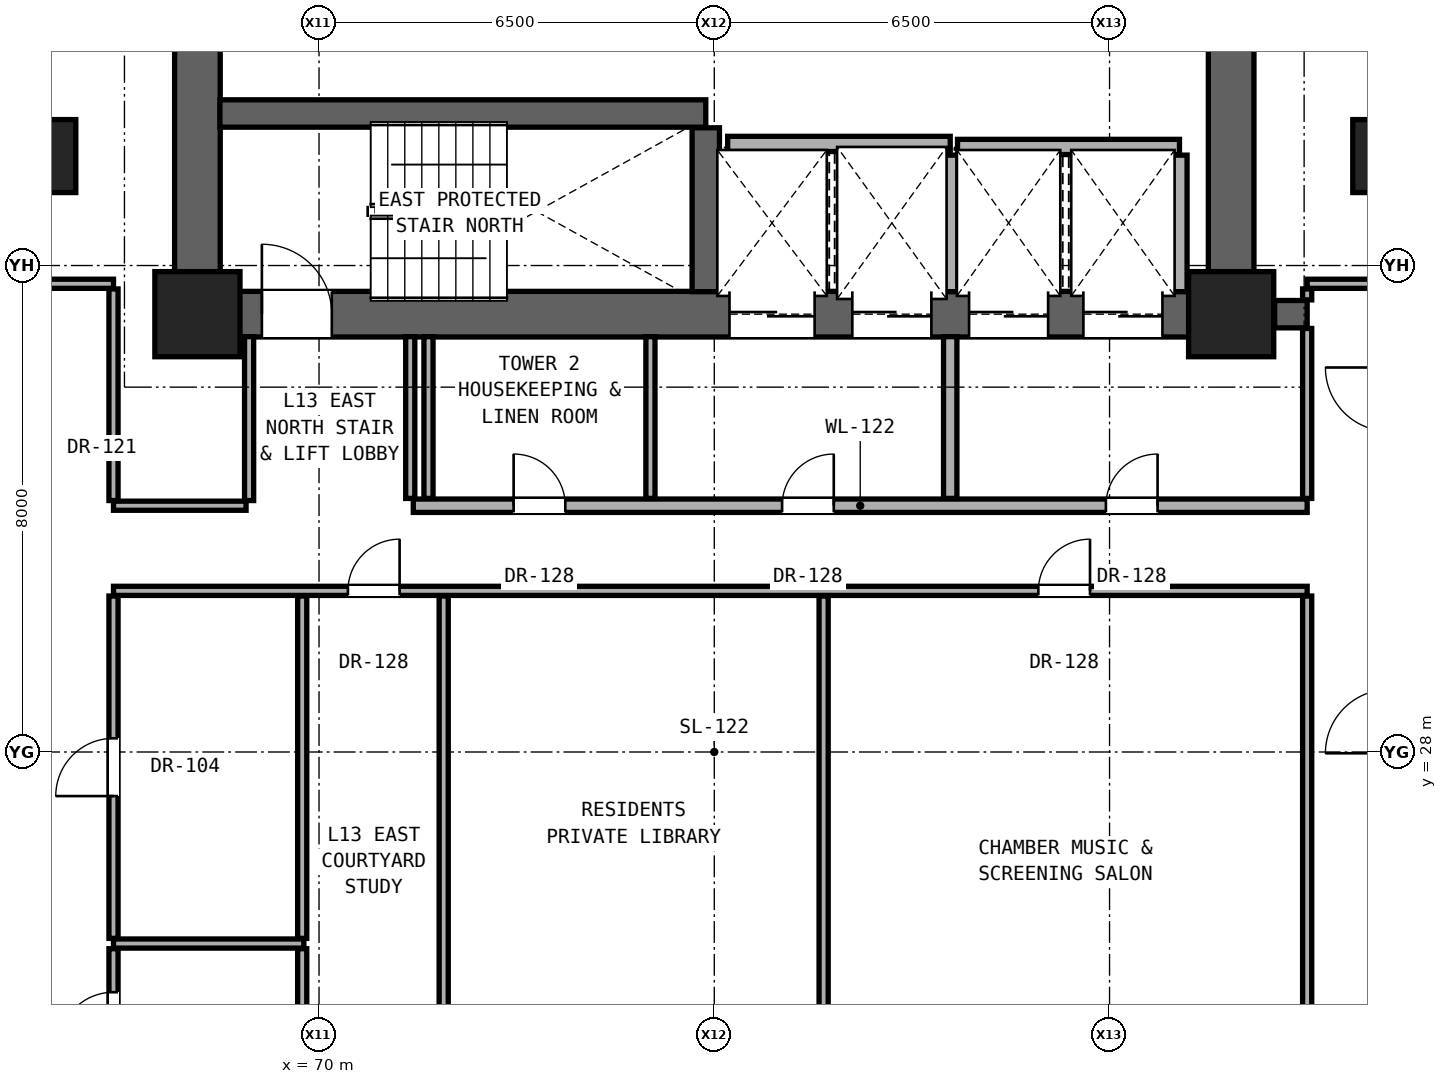
"""IFC4 building model, lengths in metres.
Left out: names, types, materials, properties, quantities, classifications, styles, units other than length and angle.
Written with IfcOpenShell. Run it as: python <this file> out.ifc"""

import sys

from ifc_helpers import new_model, si_unit, direction, frame, frame_2d, origin, origin_2d, place, context, subcontext, project, spatial, rectangle, extrude, element, fill, save


model = new_model("IFC4")
c1 = context("Model", 3, precision=1e-05, world=origin(), true_north=direction((0.0, 1.0)))
c2 = subcontext(c1, "Body", "Model", "MODEL_VIEW")
j1 = project(units=[si_unit("LENGTHUNIT", "METRE"), si_unit("PLANEANGLEUNIT", "RADIAN")], contexts=[c1])
p1 = place(None, origin())
s1 = spatial("IfcSite", under=j1, at=p1, CompositionType="ELEMENT")
p2 = place(p1, origin())
s2 = spatial("IfcBuilding", under=s1, at=p2, CompositionType="ELEMENT")
p3 = place(p2, frame((0.0, 0.0, 48.8)))
s3 = spatial("IfcBuildingStorey", under=s2, at=p3, CompositionType="ELEMENT", Elevation=48.8)
for number, where, z_axis, x_axis in (
    (1, (68.0, 35.2, 0.0), (0.0, 0.0, 1.0), (1.0, 0.0, 0.0)),
    (2, (85.0, 35.2, 0.0), (0.0, 0.0, 1.0), (1.0, 0.0, 0.0)),
):
    element("IfcColumn", number, at=place(p3, frame(where, z_axis=z_axis, x_axis=x_axis)), inside=s3, PredefinedType="COLUMN", context=c2, shape_type="SweptSolid", body=[
        extrude(rectangle(XDim=1.4, YDim=1.4, at=origin_2d()), origin(), (0.0, 0.0, 1.0), 3.3),
    ])
for number, where, z_axis, x_axis in (
    (3, (65.6, 37.8, 0.0), (0.0, 0.0, 1.0), (1.0, 0.0, 0.0)),
    (4, (87.4, 37.8, 0.0), (0.0, 0.0, 1.0), (1.0, 0.0, 0.0)),
):
    element("IfcColumn", number, at=place(p3, frame(where, z_axis=z_axis, x_axis=x_axis)), inside=s3, PredefinedType="PILASTER", context=c2, shape_type="SweptSolid", body=[
        extrude(rectangle(XDim=0.8, YDim=1.2, at=origin_2d()), origin(), (0.0, 0.0, 1.0), 3.3),
    ])
for number, where, z_axis, x_axis in (
    (5, (68.0, 35.2, 0.0), (0.0, 0.0, 1.0), (0.0, 1.0, 0.0)),
    (6, (85.0, 35.2, 0.0), (0.0, 0.0, 1.0), (0.0, 1.0, 0.0)),
):
    element("IfcWall", number, at=place(p3, frame(where, z_axis=z_axis, x_axis=x_axis)), inside=s3, PredefinedType="SHEAR", context=c2, shape_type="SweptSolid", body=[
        extrude(rectangle(XDim=5.6, YDim=0.75, at=frame_2d((2.8, 0.0))), origin(), (0.0, 0.0, 1.0), 3.06),
    ])
p4 = place(p3, frame((68.0, 35.2, 0.0), z_axis=(0.0, 0.0, 1.0), x_axis=(1.0, 0.0, 0.0)))
e7 = element("IfcWall", 7, at=p4, inside=s3, PredefinedType="SHEAR", context=c2, shape_type="SweptSolid", body=[
    extrude(rectangle(XDim=17.0, YDim=0.75, at=frame_2d((8.5, 0.0))), origin(), (0.0, 0.0, 1.0), 3.06),
])
p5 = place(p4, frame((1.06, 0.0, 0.0)))
e8 = element("IfcOpeningElement", 8, at=p5, cuts=e7, PredefinedType="OPENING", context=c2, shape_type="SweptSolid", body=[
    extrude(rectangle(XDim=1.15, YDim=2.2, at=frame_2d((0.575, 1.1))), frame((0.0, 0.385, 0.0), z_axis=(0.0, -1.0, 0.0), x_axis=(1.0, 0.0, 0.0)), (0.0, 0.0, 1.0), 0.77),
])
p6 = place(p4, frame((8.75, 0.0, 0.0)))
e9 = element("IfcOpeningElement", 9, at=p6, cuts=e7, PredefinedType="OPENING", context=c2, shape_type="SweptSolid", body=[
    extrude(rectangle(XDim=1.4, YDim=2.35, at=frame_2d((0.7, 1.175))), frame((0.0, 0.385, 0.0), z_axis=(0.0, -1.0, 0.0), x_axis=(1.0, 0.0, 0.0)), (0.0, 0.0, 1.0), 0.77),
])
p7 = place(p4, frame((10.77, 0.0, 0.0)))
e10 = element("IfcOpeningElement", 10, at=p7, cuts=e7, PredefinedType="OPENING", context=c2, shape_type="SweptSolid", body=[
    extrude(rectangle(XDim=1.3, YDim=2.3, at=frame_2d((0.65, 1.15))), frame((0.0, 0.385, 0.0), z_axis=(0.0, -1.0, 0.0), x_axis=(1.0, 0.0, 0.0)), (0.0, 0.0, 1.0), 0.77),
])
p8 = place(p4, frame((12.69, 0.0, 0.0)))
e11 = element("IfcOpeningElement", 11, at=p8, cuts=e7, PredefinedType="OPENING", context=c2, shape_type="SweptSolid", body=[
    extrude(rectangle(XDim=1.3, YDim=2.3, at=frame_2d((0.65, 1.15))), frame((0.0, 0.385, 0.0), z_axis=(0.0, -1.0, 0.0), x_axis=(1.0, 0.0, 0.0)), (0.0, 0.0, 1.0), 0.77),
])
p9 = place(p4, frame((14.57, 0.0, 0.0)))
e12 = element("IfcOpeningElement", 12, at=p9, cuts=e7, PredefinedType="OPENING", context=c2, shape_type="SweptSolid", body=[
    extrude(rectangle(XDim=1.3, YDim=2.3, at=frame_2d((0.65, 1.15))), frame((0.0, 0.385, 0.0), z_axis=(0.0, -1.0, 0.0), x_axis=(1.0, 0.0, 0.0)), (0.0, 0.0, 1.0), 0.77),
])
p10 = place(p3, frame((66.62, 24.85, 0.0), z_axis=(0.0, 0.0, 1.0), x_axis=(1.0, 0.0, 0.0)))
e13 = element("IfcWall", 13, at=p10, inside=s3, PredefinedType="PARTITIONING", context=c2, shape_type="SweptSolid", body=[
    extrude(rectangle(XDim=3.13, YDim=0.15, at=frame_2d((1.565, 0.0))), origin(), (0.0, 0.0, 1.0), 2.125),
])
p11 = place(p3, frame((66.62, 30.65, 0.0), z_axis=(0.0, 0.0, 1.0), x_axis=(1.0, 0.0, 0.0)))
e14 = element("IfcWall", 14, at=p11, inside=s3, PredefinedType="PARTITIONING", context=c2, shape_type="SweptSolid", body=[
    extrude(rectangle(XDim=19.63, YDim=0.15, at=frame_2d((9.815, 0.0))), origin(), (0.0, 0.0, 1.0), 2.125),
])
p12 = place(p11, frame((3.855, 0.0, 0.0)))
e15 = element("IfcOpeningElement", 15, at=p12, cuts=e14, PredefinedType="OPENING", context=c2, shape_type="SweptSolid", body=[
    extrude(rectangle(XDim=0.85, YDim=2.01, at=frame_2d((0.425, 1.005))), frame((0.0, 0.085, 0.0), z_axis=(0.0, -1.0, 0.0), x_axis=(1.0, 0.0, 0.0)), (0.0, 0.0, 1.0), 0.17),
])
p13 = place(p11, frame((15.209, 0.0, 0.0)))
e16 = element("IfcOpeningElement", 16, at=p13, cuts=e14, PredefinedType="OPENING", context=c2, shape_type="SweptSolid", body=[
    extrude(rectangle(XDim=0.85, YDim=2.01, at=frame_2d((0.425, 1.005))), frame((0.0, 0.085, 0.0), z_axis=(0.0, -1.0, 0.0), x_axis=(1.0, 0.0, 0.0)), (0.0, 0.0, 1.0), 0.17),
])
p14 = place(p3, frame((66.62, 32.05, 0.0), z_axis=(0.0, 0.0, 1.0), x_axis=(1.0, 0.0, 0.0)))
e17 = element("IfcWall", 17, at=p14, inside=s3, PredefinedType="PARTITIONING", context=c2, shape_type="SweptSolid", body=[
    extrude(rectangle(XDim=2.18, YDim=0.15, at=frame_2d((1.09, 0.0))), origin(), (0.0, 0.0, 1.0), 2.125),
])
p15 = place(p3, frame((71.55, 32.05, 0.0), z_axis=(0.0, 0.0, 1.0), x_axis=(1.0, 0.0, 0.0)))
e18 = element("IfcWall", 18, at=p15, inside=s3, PredefinedType="SOLIDWALL", context=c2, shape_type="SweptSolid", body=[
    extrude(rectangle(XDim=14.7, YDim=0.22, at=frame_2d((7.35, 0.0))), origin(), (0.0, 0.0, 1.0), 2.125),
])
p16 = place(p15, frame((11.39, 0.0, 0.0)))
e19 = element("IfcOpeningElement", 19, at=p16, cuts=e18, PredefinedType="OPENING", context=c2, shape_type="SweptSolid", body=[
    extrude(rectangle(XDim=0.85, YDim=2.01, at=frame_2d((0.425, 1.005))), frame((0.0, 0.12, 0.0), z_axis=(0.0, -1.0, 0.0), x_axis=(1.0, 0.0, 0.0)), (0.0, 0.0, 1.0), 0.24),
])
p17 = place(p15, frame((6.065, 0.0, 0.0)))
e20 = element("IfcOpeningElement", 20, at=p17, cuts=e18, PredefinedType="OPENING", context=c2, shape_type="SweptSolid", body=[
    extrude(rectangle(XDim=0.85, YDim=2.01, at=frame_2d((0.425, 1.005))), frame((0.0, 0.12, 0.0), z_axis=(0.0, -1.0, 0.0), x_axis=(1.0, 0.0, 0.0)), (0.0, 0.0, 1.0), 0.24),
])
p18 = place(p15, frame((1.65, 0.0, 0.0)))
e21 = element("IfcOpeningElement", 21, at=p18, cuts=e18, PredefinedType="OPENING", context=c2, shape_type="SweptSolid", body=[
    extrude(rectangle(XDim=0.85, YDim=2.01, at=frame_2d((0.425, 1.005))), frame((0.0, 0.12, 0.0), z_axis=(0.0, -1.0, 0.0), x_axis=(1.0, 0.0, 0.0)), (0.0, 0.0, 1.0), 0.24),
])
p19 = place(p3, frame((85.715, 35.2, 0.0), z_axis=(0.0, 0.0, 1.0), x_axis=(1.0, 0.0, 0.0)))
e22 = element("IfcWall", 22, at=p19, inside=s3, PredefinedType="SHEAR", context=c2, shape_type="SweptSolid", body=[
    extrude(rectangle(XDim=0.535, YDim=0.45, at=frame_2d((0.268, 0.0))), origin(), (0.0, 0.0, 1.0), 3.06),
])
p20 = place(p3, frame((65.25, 35.7, 0.0), z_axis=(0.0, 0.0, 1.0), x_axis=(1.0, 0.0, 0.0)))
e23 = element("IfcWall", 23, at=p20, inside=s3, PredefinedType="PARTITIONING", context=c2, shape_type="SweptSolid", body=[
    extrude(rectangle(XDim=1.37, YDim=0.15, at=frame_2d((0.685, 0.0))), origin(), (0.0, 0.0, 1.0), 3.06),
])
p21 = place(p3, frame((86.25, 35.7, 0.0), z_axis=(0.0, 0.0, 1.0), x_axis=(1.0, 0.0, 0.0)))
e24 = element("IfcWall", 24, at=p21, inside=s3, PredefinedType="PARTITIONING", context=c2, shape_type="SweptSolid", body=[
    extrude(rectangle(XDim=1.35, YDim=0.15, at=frame_2d((0.675, 0.0))), origin(), (0.0, 0.0, 1.0), 3.06),
])
p22 = place(p3, frame((80.5, 37.95, 0.0), z_axis=(0.0, 0.0, 1.0), x_axis=(1.0, 0.0, 0.0)))
e25 = element("IfcWall", 25, at=p22, inside=s3, PredefinedType="SOLIDWALL", context=c2, shape_type="SweptSolid", body=[
    extrude(rectangle(XDim=3.65, YDim=0.25, at=frame_2d((1.825, 0.0))), origin(), (0.0, 0.0, 1.0), 3.06),
])
p23 = place(p3, frame((76.72, 38.0, 0.0), z_axis=(0.0, 0.0, 1.0), x_axis=(1.0, 0.0, 0.0)))
e26 = element("IfcWall", 26, at=p23, inside=s3, PredefinedType="SOLIDWALL", context=c2, shape_type="SweptSolid", body=[
    extrude(rectangle(XDim=3.66, YDim=0.25, at=frame_2d((1.83, 0.0))), origin(), (0.0, 0.0, 1.0), 3.06),
])
p24 = place(p3, frame((68.37, 38.5, 0.0), z_axis=(0.0, 0.0, 1.0), x_axis=(1.0, 0.0, 0.0)))
e27 = element("IfcWall", 27, at=p24, inside=s3, PredefinedType="SHEAR", context=c2, shape_type="SweptSolid", body=[
    extrude(rectangle(XDim=7.99, YDim=0.45, at=frame_2d((3.995, 0.0))), origin(), (0.0, 0.0, 1.0), 3.06),
])
p25 = place(p3, frame((66.62, 22.435, 0.0), z_axis=(0.0, 0.0, 1.0), x_axis=(0.0, 1.0, 0.0)))
e28 = element("IfcWall", 28, at=p25, inside=s3, PredefinedType="PARTITIONING", context=c2, shape_type="SweptSolid", body=[
    extrude(rectangle(XDim=2.33, YDim=0.15, at=frame_2d((1.165, 0.0))), origin(), (0.0, 0.0, 1.0), 3.06),
])
p26 = place(p25, frame((0.715, 0.0, 0.0)))
e29 = element("IfcOpeningElement", 29, at=p26, cuts=e28, PredefinedType="OPENING", context=c2, shape_type="SweptSolid", body=[
    extrude(rectangle(XDim=0.9, YDim=2.1, at=frame_2d((0.45, 1.05))), frame((0.0, 0.085, 0.0), z_axis=(0.0, -1.0, 0.0), x_axis=(1.0, 0.0, 0.0)), (0.0, 0.0, 1.0), 0.17),
])
p27 = place(p3, frame((66.62, 24.935, 0.0), z_axis=(0.0, 0.0, 1.0), x_axis=(0.0, 1.0, 0.0)))
e30 = element("IfcWall", 30, at=p27, inside=s3, PredefinedType="PARTITIONING", context=c2, shape_type="SweptSolid", body=[
    extrude(rectangle(XDim=5.63, YDim=0.15, at=frame_2d((2.815, 0.0))), origin(), (0.0, 0.0, 1.0), 2.279),
])
p28 = place(p27, frame((2.34, 0.0, 0.0)))
e31 = element("IfcOpeningElement", 31, at=p28, cuts=e30, PredefinedType="OPENING", context=c2, shape_type="SweptSolid", body=[
    extrude(rectangle(XDim=0.95, YDim=2.15, at=frame_2d((0.475, 1.075))), frame((0.0, 0.085, 0.0), z_axis=(0.0, -1.0, 0.0), x_axis=(1.0, 0.0, 0.0)), (0.0, 0.0, 1.0), 0.17),
])
p29 = place(p3, frame((66.62, 32.135, 0.0), z_axis=(0.0, 0.0, 1.0), x_axis=(0.0, 1.0, 0.0)))
e32 = element("IfcWall", 32, at=p29, inside=s3, PredefinedType="PARTITIONING", context=c2, shape_type="SweptSolid", body=[
    extrude(rectangle(XDim=3.48, YDim=0.15, at=frame_2d((1.74, 0.0))), origin(), (0.0, 0.0, 1.0), 2.452),
])
p30 = place(p3, frame((68.85, 32.135, 0.0), z_axis=(0.0, 0.0, 1.0), x_axis=(0.0, 1.0, 0.0)))
e33 = element("IfcWall", 33, at=p30, inside=s3, PredefinedType="PARTITIONING", context=c2, shape_type="SweptSolid", body=[
    extrude(rectangle(XDim=2.695, YDim=0.15, at=frame_2d((1.348, 0.0))), origin(), (0.0, 0.0, 1.0), 3.06),
])
p31 = place(p3, frame((69.723, 22.435, 0.0), z_axis=(0.0, 0.0, 1.0), x_axis=(0.0, 1.0, 0.0)))
e34 = element("IfcWall", 34, at=p31, inside=s3, PredefinedType="PARTITIONING", context=c2, shape_type="SweptSolid", body=[
    extrude(rectangle(XDim=2.33, YDim=0.15, at=frame_2d((1.165, 0.0))), origin(), (0.0, 0.0, 1.0), 3.06),
])
p32 = place(p3, frame((69.723, 24.935, 0.0), z_axis=(0.0, 0.0, 1.0), x_axis=(0.0, 1.0, 0.0)))
e35 = element("IfcWall", 35, at=p32, inside=s3, PredefinedType="PARTITIONING", context=c2, shape_type="SweptSolid", body=[
    extrude(rectangle(XDim=5.63, YDim=0.15, at=frame_2d((2.815, 0.0))), origin(), (0.0, 0.0, 1.0), 2.125),
])
for number, where, z_axis, x_axis in (
    (36, (71.5, 32.17, 0.0), (0.0, 0.0, 1.0), (0.0, 1.0, 0.0)),
    (37, (71.8, 32.17, 0.0), (0.0, 0.0, 1.0), (0.0, 1.0, 0.0)),
):
    element("IfcWall", number, at=place(p3, frame(where, z_axis=z_axis, x_axis=x_axis)), inside=s3, PredefinedType="PARTITIONING", context=c2, shape_type="SweptSolid", body=[
        extrude(rectangle(XDim=2.66, YDim=0.15, at=frame_2d((1.33, 0.0))), origin(), (0.0, 0.0, 1.0), 3.06),
    ])
p33 = place(p3, frame((72.05, 22.435, 0.0), z_axis=(0.0, 0.0, 1.0), x_axis=(0.0, 1.0, 0.0)))
e38 = element("IfcWall", 38, at=p33, inside=s3, PredefinedType="PARTITIONING", context=c2, shape_type="SweptSolid", body=[
    extrude(rectangle(XDim=8.13, YDim=0.15, at=frame_2d((4.065, 0.0))), origin(), (0.0, 0.0, 1.0), 2.125),
])
p34 = place(p3, frame((75.45, 32.17, 0.0), z_axis=(0.0, 0.0, 1.0), x_axis=(0.0, 1.0, 0.0)))
e39 = element("IfcWall", 39, at=p34, inside=s3, PredefinedType="PARTITIONING", context=c2, shape_type="SweptSolid", body=[
    extrude(rectangle(XDim=2.66, YDim=0.15, at=frame_2d((1.33, 0.0))), origin(), (0.0, 0.0, 1.0), 3.06),
])
p35 = place(p3, frame((76.36, 35.57, 0.0), z_axis=(0.0, 0.0, 1.0), x_axis=(0.0, 1.0, 0.0)))
e40 = element("IfcWall", 40, at=p35, inside=s3, PredefinedType="SHEAR", context=c2, shape_type="SweptSolid", body=[
    extrude(rectangle(XDim=2.695, YDim=0.45, at=frame_2d((1.347, 0.0))), origin(), (0.0, 0.0, 1.0), 3.06),
])
p36 = place(p3, frame((78.298, 22.435, 0.0), z_axis=(0.0, 0.0, 1.0), x_axis=(0.0, 1.0, 0.0)))
e41 = element("IfcWall", 41, at=p36, inside=s3, PredefinedType="PARTITIONING", context=c2, shape_type="SweptSolid", body=[
    extrude(rectangle(XDim=8.13, YDim=0.15, at=frame_2d((4.065, 0.0))), origin(), (0.0, 0.0, 1.0), 2.125),
])
p37 = place(p3, frame((80.38, 32.17, 0.0), z_axis=(0.0, 0.0, 1.0), x_axis=(0.0, 1.0, 0.0)))
e42 = element("IfcWall", 42, at=p37, inside=s3, PredefinedType="SOLIDWALL", context=c2, shape_type="SweptSolid", body=[
    extrude(rectangle(XDim=2.66, YDim=0.22, at=frame_2d((1.33, 0.0))), origin(), (0.0, 0.0, 1.0), 3.06),
])
for number, where, z_axis, x_axis in (
    (43, (80.38, 35.57, 0.0), (0.0, 0.0, 1.0), (0.0, 1.0, 0.0)),
    (44, (84.15, 35.57, 0.0), (0.0, 0.0, 1.0), (0.0, 1.0, 0.0)),
):
    element("IfcWall", number, at=place(p3, frame(where, z_axis=z_axis, x_axis=x_axis)), inside=s3, PredefinedType="SOLIDWALL", context=c2, shape_type="SweptSolid", body=[
        extrude(rectangle(XDim=2.245, YDim=0.25, at=frame_2d((1.123, 0.0))), origin(), (0.0, 0.0, 1.0), 3.06),
    ])
p38 = place(p3, frame((86.25, 22.435, 0.0), z_axis=(0.0, 0.0, 1.0), x_axis=(0.0, 1.0, 0.0)))
e45 = element("IfcWall", 45, at=p38, inside=s3, PredefinedType="PARTITIONING", context=c2, shape_type="SweptSolid", body=[
    extrude(rectangle(XDim=8.13, YDim=0.15, at=frame_2d((4.065, 0.0))), origin(), (0.0, 0.0, 1.0), 2.279),
])
p39 = place(p3, frame((86.25, 32.17, 0.0), z_axis=(0.0, 0.0, 1.0), x_axis=(0.0, 1.0, 0.0)))
e46 = element("IfcWall", 46, at=p39, inside=s3, PredefinedType="PARTITIONING", context=c2, shape_type="SweptSolid", body=[
    extrude(rectangle(XDim=2.795, YDim=0.15, at=frame_2d((1.397, 0.0))), origin(), (0.0, 0.0, 1.0), 2.452),
])
p40 = place(p3, frame((86.25, 35.435, 0.0), z_axis=(0.0, 0.0, 1.0), x_axis=(0.0, 1.0, 0.0)))
e47 = element("IfcWall", 47, at=p40, inside=s3, PredefinedType="PARTITIONING", context=c2, shape_type="SweptSolid", body=[
    extrude(rectangle(XDim=0.18, YDim=0.15, at=frame_2d((0.09, 0.0))), origin(), (0.0, 0.0, 1.0), 2.452),
])
p41 = place(p16, origin())
e48 = element("IfcDoor", 48, at=p41, inside=s3, OperationType="SINGLE_SWING_RIGHT", PredefinedType="DOOR", context=c2, shape_type="SweptSolid", body=[
    extrude(rectangle(XDim=0.85, YDim=2.01, at=frame_2d((0.425, 1.005))), frame((0.0, 0.025, 0.0), z_axis=(0.0, -1.0, 0.0), x_axis=(1.0, 0.0, 0.0)), (0.0, 0.0, 1.0), 0.05),
])
fill(e19, e48)
p42 = place(p5, origin())
e49 = element("IfcDoor", 49, at=p42, inside=s3, OperationType="SINGLE_SWING_LEFT", PredefinedType="DOOR", context=c2, shape_type="SweptSolid", body=[
    extrude(rectangle(XDim=1.15, YDim=2.2, at=frame_2d((0.575, 1.1))), frame((0.0, 0.025, 0.0), z_axis=(0.0, -1.0, 0.0), x_axis=(1.0, 0.0, 0.0)), (0.0, 0.0, 1.0), 0.05),
])
fill(e8, e49)
p43 = place(p17, origin())
e50 = element("IfcDoor", 50, at=p43, inside=s3, OperationType="SINGLE_SWING_RIGHT", PredefinedType="DOOR", context=c2, shape_type="SweptSolid", body=[
    extrude(rectangle(XDim=0.85, YDim=2.01, at=frame_2d((0.425, 1.005))), frame((0.0, 0.025, 0.0), z_axis=(0.0, -1.0, 0.0), x_axis=(1.0, 0.0, 0.0)), (0.0, 0.0, 1.0), 0.05),
])
fill(e20, e50)
p44 = place(p18, origin())
e51 = element("IfcDoor", 51, at=p44, inside=s3, OperationType="SINGLE_SWING_LEFT", PredefinedType="DOOR", context=c2, shape_type="SweptSolid", body=[
    extrude(rectangle(XDim=0.85, YDim=2.01, at=frame_2d((0.425, 1.005))), frame((0.0, 0.025, 0.0), z_axis=(0.0, -1.0, 0.0), x_axis=(1.0, 0.0, 0.0)), (0.0, 0.0, 1.0), 0.05),
])
fill(e21, e51)
p45 = place(p26, origin())
e52 = element("IfcDoor", 52, at=p45, inside=s3, OperationType="SINGLE_SWING_LEFT", PredefinedType="DOOR", context=c2, shape_type="SweptSolid", body=[
    extrude(rectangle(XDim=0.9, YDim=2.1, at=frame_2d((0.45, 1.05))), frame((0.0, 0.025, 0.0), z_axis=(0.0, -1.0, 0.0), x_axis=(1.0, 0.0, 0.0)), (0.0, 0.0, 1.0), 0.05),
])
fill(e29, e52)
p46 = place(p28, origin())
e53 = element("IfcDoor", 53, at=p46, inside=s3, OperationType="SINGLE_SWING_LEFT", PredefinedType="DOOR", context=c2, shape_type="SweptSolid", body=[
    extrude(rectangle(XDim=0.95, YDim=2.15, at=frame_2d((0.475, 1.075))), frame((0.0, 0.025, 0.0), z_axis=(0.0, -1.0, 0.0), x_axis=(1.0, 0.0, 0.0)), (0.0, 0.0, 1.0), 0.05),
])
fill(e31, e53)
p47 = place(p12, origin())
e54 = element("IfcDoor", 54, at=p47, inside=s3, OperationType="SINGLE_SWING_RIGHT", PredefinedType="DOOR", context=c2, shape_type="SweptSolid", body=[
    extrude(rectangle(XDim=0.85, YDim=2.01, at=frame_2d((0.425, 1.005))), frame((0.0, 0.025, 0.0), z_axis=(0.0, -1.0, 0.0), x_axis=(1.0, 0.0, 0.0)), (0.0, 0.0, 1.0), 0.05),
])
fill(e15, e54)
p48 = place(p13, origin())
e55 = element("IfcDoor", 55, at=p48, inside=s3, OperationType="SINGLE_SWING_RIGHT", PredefinedType="DOOR", context=c2, shape_type="SweptSolid", body=[
    extrude(rectangle(XDim=0.85, YDim=2.01, at=frame_2d((0.425, 1.005))), frame((0.0, 0.025, 0.0), z_axis=(0.0, -1.0, 0.0), x_axis=(1.0, 0.0, 0.0)), (0.0, 0.0, 1.0), 0.05),
])
fill(e16, e55)
p49 = place(p6, origin())
e56 = element("IfcDoor", 56, at=p49, inside=s3, OperationType="DOUBLE_DOOR_SLIDING", PredefinedType="DOOR", context=c2, shape_type="SweptSolid", body=[
    extrude(rectangle(XDim=1.4, YDim=2.35, at=frame_2d((0.7, 1.175))), frame((0.0, 0.025, 0.0), z_axis=(0.0, -1.0, 0.0), x_axis=(1.0, 0.0, 0.0)), (0.0, 0.0, 1.0), 0.05),
])
fill(e9, e56)
p50 = place(p7, origin())
e57 = element("IfcDoor", 57, at=p50, inside=s3, OperationType="DOUBLE_DOOR_SLIDING", PredefinedType="DOOR", context=c2, shape_type="SweptSolid", body=[
    extrude(rectangle(XDim=1.3, YDim=2.3, at=frame_2d((0.65, 1.15))), frame((0.0, 0.025, 0.0), z_axis=(0.0, -1.0, 0.0), x_axis=(1.0, 0.0, 0.0)), (0.0, 0.0, 1.0), 0.05),
])
fill(e10, e57)
p51 = place(p8, origin())
e58 = element("IfcDoor", 58, at=p51, inside=s3, OperationType="DOUBLE_DOOR_SLIDING", PredefinedType="DOOR", context=c2, shape_type="SweptSolid", body=[
    extrude(rectangle(XDim=1.3, YDim=2.3, at=frame_2d((0.65, 1.15))), frame((0.0, 0.025, 0.0), z_axis=(0.0, -1.0, 0.0), x_axis=(1.0, 0.0, 0.0)), (0.0, 0.0, 1.0), 0.05),
])
fill(e11, e58)
p52 = place(p9, origin())
e59 = element("IfcDoor", 59, at=p52, inside=s3, OperationType="DOUBLE_DOOR_SLIDING", PredefinedType="DOOR", context=c2, shape_type="SweptSolid", body=[
    extrude(rectangle(XDim=1.3, YDim=2.3, at=frame_2d((0.65, 1.15))), frame((0.0, 0.025, 0.0), z_axis=(0.0, -1.0, 0.0), x_axis=(1.0, 0.0, 0.0)), (0.0, 0.0, 1.0), 0.05),
])
fill(e12, e59)
save(model, sys.argv[1])
